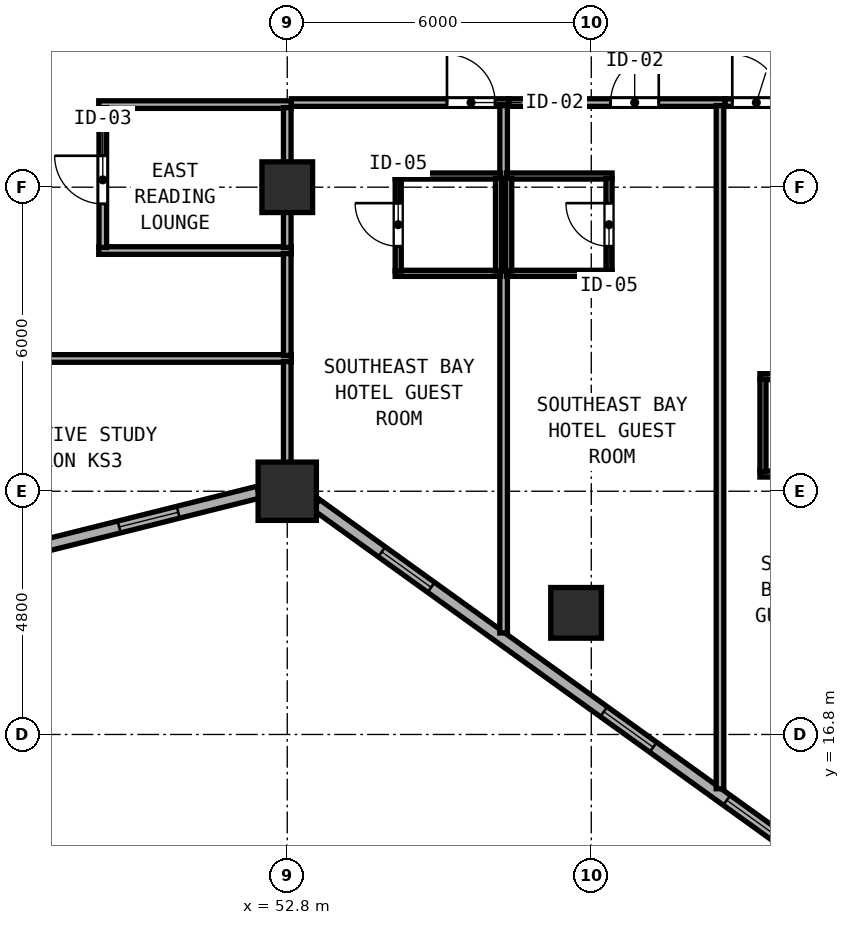
"""IFC4 building model, lengths in metres.
Left out: names, types, materials, properties, quantities, classifications, styles, units other than length and angle.
Written with IfcOpenShell. Run it as: python <this file> out.ifc"""

import sys

from ifc_helpers import new_model, si_unit, direction, frame, frame_2d, origin, origin_2d, place, context, subcontext, project, spatial, rectangle, hollow_rectangle, extrude, element, fill, save


model = new_model("IFC4")
c1 = context("Model", 3, precision=1e-05, world=origin(), true_north=direction((0.0, 1.0)))
c2 = subcontext(c1, "Body", "Model", "MODEL_VIEW")
j1 = project(units=[si_unit("LENGTHUNIT", "METRE"), si_unit("PLANEANGLEUNIT", "RADIAN")], contexts=[c1])
p1 = place(None, origin())
s1 = spatial("IfcSite", under=j1, at=p1, CompositionType="ELEMENT")
p2 = place(p1, origin())
s2 = spatial("IfcBuilding", under=s1, at=p2, CompositionType="ELEMENT")
p3 = place(p2, frame((0.0, 0.0, 55.2)))
s3 = spatial("IfcBuildingStorey", under=s2, at=p3, CompositionType="ELEMENT", Elevation=55.2)
p4 = place(p3, frame((52.8, 21.6, 0.0), z_axis=(0.0, 0.0, 1.0), x_axis=(1.0, 0.0, 0.0)))
e1 = element("IfcColumn", 1, at=p4, inside=s3, PredefinedType="COLUMN", context=c2, shape_type="SweptSolid", body=[
    extrude(hollow_rectangle(XDim=1.15, YDim=1.15, WallThickness=0.042, at=origin_2d()), origin(), (0.0, 0.0, 1.0), 3.8),
])
for number, where, z_axis, x_axis in (
    (2, (52.8, 27.6, 0.0), (0.0, 0.0, 1.0), (1.0, 0.0, 0.0)),
    (3, (58.5, 19.2, 0.0), (0.0, 0.0, 1.0), (1.0, 0.0, 0.0)),
):
    element("IfcColumn", number, at=place(p3, frame(where, z_axis=z_axis, x_axis=x_axis)), inside=s3, PredefinedType="COLUMN", context=c2, shape_type="SweptSolid", body=[
        extrude(hollow_rectangle(XDim=1.0, YDim=1.0, WallThickness=0.038, at=origin_2d()), origin(), (0.0, 0.0, 1.0), 3.8),
    ])
p5 = place(p3, frame((47.932, 20.507, 0.0), z_axis=(0.0, 0.0, 1.0), x_axis=(0.970145739396, 0.242522667667, 0.0)))
e4 = element("IfcWall", 4, at=p5, inside=s3, PredefinedType="SOLIDWALL", context=c2, shape_type="SweptSolid", body=[
    extrude(rectangle(XDim=4.433, YDim=0.24, at=frame_2d((2.217, 0.0))), origin(), (0.0, 0.0, 1.0), 3.097),
])
p6 = place(p5, frame((1.6, 0.0, 0.85)))
e5 = element("IfcOpeningElement", 5, at=p6, cuts=e4, PredefinedType="OPENING", context=c2, shape_type="SweptSolid", body=[
    extrude(rectangle(XDim=1.2, YDim=1.85, at=frame_2d((0.6, 0.925))), frame((0.0, 0.13, 0.0), z_axis=(0.0, -1.0, 0.0), x_axis=(1.0, 0.0, 0.0)), (0.0, 0.0, 1.0), 0.26),
])
p7 = place(p3, frame((53.367, 21.34, 0.0), z_axis=(0.0, 0.0, 1.0), x_axis=(0.811543176492, -0.58429245476, 0.0)))
e6 = element("IfcWall", 6, at=p7, inside=s3, PredefinedType="SOLIDWALL", context=c2, shape_type="SweptSolid", body=[
    extrude(rectangle(XDim=11.531, YDim=0.24, at=frame_2d((5.765, 0.0))), origin(), (0.0, 0.0, 1.0), 3.097),
])
p8 = place(p7, frame((1.6, 0.0, 0.85)))
e7 = element("IfcOpeningElement", 7, at=p8, cuts=e6, PredefinedType="OPENING", context=c2, shape_type="SweptSolid", body=[
    extrude(rectangle(XDim=1.2, YDim=1.85, at=frame_2d((0.6, 0.925))), frame((0.0, 0.13, 0.0), z_axis=(0.0, -1.0, 0.0), x_axis=(1.0, 0.0, 0.0)), (0.0, 0.0, 1.0), 0.26),
])
p9 = place(p7, frame((7.0, 0.0, 0.85)))
e8 = element("IfcOpeningElement", 8, at=p9, cuts=e6, PredefinedType="OPENING", context=c2, shape_type="SweptSolid", body=[
    extrude(rectangle(XDim=1.2, YDim=1.85, at=frame_2d((0.6, 0.925))), frame((0.0, 0.13, 0.0), z_axis=(0.0, -1.0, 0.0), x_axis=(1.0, 0.0, 0.0)), (0.0, 0.0, 1.0), 0.26),
])
p10 = place(p7, frame((9.99, 0.0, 0.85)))
e9 = element("IfcOpeningElement", 9, at=p10, cuts=e6, PredefinedType="OPENING", context=c2, shape_type="SweptSolid", body=[
    extrude(rectangle(XDim=1.2, YDim=1.85, at=frame_2d((0.6, 0.925))), frame((0.0, 0.13, 0.0), z_axis=(0.0, -1.0, 0.0), x_axis=(1.0, 0.0, 0.0)), (0.0, 0.0, 1.0), 0.26),
])
for number, where, z_axis, x_axis in (
    (10, (49.08, 29.23, 0.0), (0.0, 0.0, 1.0), (1.0, 0.0, 0.0)),
    (11, (49.08, 26.35, 0.0), (0.0, 0.0, 1.0), (1.0, 0.0, 0.0)),
):
    element("IfcWall", number, at=place(p3, frame(where, z_axis=z_axis, x_axis=x_axis)), inside=s3, PredefinedType="PARTITIONING", context=c2, shape_type="SweptSolid", body=[
        extrude(rectangle(XDim=3.8, YDim=0.15, at=frame_2d((1.9, 0.0))), origin(), (0.0, 0.0, 1.0), 3.6),
    ])
p11 = place(p3, frame((49.16, 26.41, 0.0), z_axis=(0.0, 0.0, 1.0), x_axis=(0.0, 1.0, 0.0)))
e12 = element("IfcWall", 12, at=p11, inside=s3, PredefinedType="PARTITIONING", context=c2, shape_type="SweptSolid", body=[
    extrude(rectangle(XDim=2.76, YDim=0.15, at=frame_2d((1.38, 0.0))), origin(), (0.0, 0.0, 1.0), 3.6),
])
p12 = place(p11, frame((0.86, 0.0, 0.0)))
e13 = element("IfcOpeningElement", 13, at=p12, cuts=e12, PredefinedType="OPENING", context=c2, shape_type="SweptSolid", body=[
    extrude(rectangle(XDim=0.95, YDim=2.12, at=frame_2d((0.475, 1.06))), frame((0.0, 0.085, 0.0), z_axis=(0.0, -1.0, 0.0), x_axis=(1.0, 0.0, 0.0)), (0.0, 0.0, 1.0), 0.17),
])
p13 = place(p3, frame((52.8, 26.41, 0.0), z_axis=(0.0, 0.0, 1.0), x_axis=(0.0, 1.0, 0.0)))
e14 = element("IfcWall", 14, at=p13, inside=s3, PredefinedType="PARTITIONING", context=c2, shape_type="SweptSolid", body=[
    extrude(rectangle(XDim=2.76, YDim=0.15, at=frame_2d((1.38, 0.0))), origin(), (0.0, 0.0, 1.0), 3.097),
])
p14 = place(p3, frame((45.682, 24.22, 0.0), z_axis=(0.0, 0.0, 1.0), x_axis=(1.0, 0.0, 0.0)))
e15 = element("IfcWall", 15, at=p14, inside=s3, PredefinedType="PARTITIONING", context=c2, shape_type="SweptSolid", body=[
    extrude(rectangle(XDim=7.198, YDim=0.15, at=frame_2d((3.599, 0.0))), origin(), (0.0, 0.0, 1.0), 3.6),
])
p15 = place(p14, frame((2.143, 0.0, 0.0), z_axis=(0.0, 0.0, 1.0), x_axis=(-1.0, 0.0, 0.0)))
e16 = element("IfcOpeningElement", 16, at=p15, cuts=e15, PredefinedType="OPENING", context=c2, shape_type="SweptSolid", body=[
    extrude(rectangle(XDim=0.95, YDim=2.12, at=frame_2d((0.475, 1.06))), frame((0.0, 0.085, 0.0), z_axis=(0.0, -1.0, 0.0), x_axis=(1.0, 0.0, 0.0)), (0.0, 0.0, 1.0), 0.17),
])
p16 = place(p3, frame((52.8, 21.819, 0.0), z_axis=(0.0, 0.0, 1.0), x_axis=(0.0, 1.0, 0.0)))
e17 = element("IfcWall", 17, at=p16, inside=s3, PredefinedType="PARTITIONING", context=c2, shape_type="SweptSolid", body=[
    extrude(rectangle(XDim=2.341, YDim=0.15, at=frame_2d((1.171, 0.0))), origin(), (0.0, 0.0, 1.0), 3.097),
])
p17 = place(p3, frame((52.882, 29.27, 0.0), z_axis=(0.0, 0.0, 1.0), x_axis=(1.0, 0.0, 0.0)))
e18 = element("IfcWall", 18, at=p17, inside=s3, PredefinedType="PARTITIONING", context=c2, shape_type="SweptSolid", body=[
    extrude(rectangle(XDim=4.288, YDim=0.15, at=frame_2d((2.144, 0.0))), origin(), (0.0, 0.0, 1.0), 3.6),
])
p18 = place(p17, frame((4.02, 0.0, 0.0), z_axis=(0.0, 0.0, 1.0), x_axis=(-1.0, 0.0, 0.0)))
e19 = element("IfcOpeningElement", 19, at=p18, cuts=e18, PredefinedType="OPENING", context=c2, shape_type="SweptSolid", body=[
    extrude(rectangle(XDim=0.95, YDim=2.15, at=frame_2d((0.475, 1.075))), frame((0.0, 0.085, 0.0), z_axis=(0.0, -1.0, 0.0), x_axis=(1.0, 0.0, 0.0)), (0.0, 0.0, 1.0), 0.17),
])
p19 = place(p3, frame((52.8, 24.28, 0.0), z_axis=(0.0, 0.0, 1.0), x_axis=(0.0, 1.0, 0.0)))
e20 = element("IfcWall", 20, at=p19, inside=s3, PredefinedType="PARTITIONING", context=c2, shape_type="SweptSolid", body=[
    extrude(rectangle(XDim=2.01, YDim=0.15, at=frame_2d((1.005, 0.0))), origin(), (0.0, 0.0, 1.0), 3.097),
])
p20 = place(p3, frame((57.07, 18.803, 0.0), z_axis=(0.0, 0.0, 1.0), x_axis=(0.0, 1.0, 0.0)))
e21 = element("IfcWall", 21, at=p20, inside=s3, PredefinedType="PARTITIONING", context=c2, shape_type="SweptSolid", body=[
    extrude(rectangle(XDim=10.407, YDim=0.15, at=frame_2d((5.204, 0.0))), origin(), (0.0, 0.0, 1.0), 3.6),
])
p21 = place(p3, frame((54.93, 27.82, 0.0), z_axis=(0.0, 0.0, 1.0), x_axis=(1.0, 0.0, 0.0)))
e22 = element("IfcWall", 22, at=p21, inside=s3, PredefinedType="PARTITIONING", context=c2, shape_type="SweptSolid", body=[
    extrude(rectangle(XDim=2.08, YDim=0.12, at=frame_2d((1.04, 0.0))), origin(), (0.0, 0.0, 1.0), 3.097),
])
p22 = place(p3, frame((54.93, 25.9, 0.0), z_axis=(0.0, 0.0, 1.0), x_axis=(1.0, 0.0, 0.0)))
e23 = element("IfcWall", 23, at=p22, inside=s3, PredefinedType="PARTITIONING", context=c2, shape_type="SweptSolid", body=[
    extrude(rectangle(XDim=2.08, YDim=0.12, at=frame_2d((1.04, 0.0))), origin(), (0.0, 0.0, 1.0), 3.6),
])
p23 = place(p3, frame((54.99, 25.945, 0.0), z_axis=(0.0, 0.0, 1.0), x_axis=(0.0, 1.0, 0.0)))
e24 = element("IfcWall", 24, at=p23, inside=s3, PredefinedType="PARTITIONING", context=c2, shape_type="SweptSolid", body=[
    extrude(rectangle(XDim=1.83, YDim=0.12, at=frame_2d((0.915, 0.0))), origin(), (0.0, 0.0, 1.0), 3.6),
])
p24 = place(p23, frame((1.34, 0.0, 0.0), z_axis=(0.0, 0.0, 1.0), x_axis=(-1.0, 0.0, 0.0)))
e25 = element("IfcOpeningElement", 25, at=p24, cuts=e24, PredefinedType="OPENING", context=c2, shape_type="SweptSolid", body=[
    extrude(rectangle(XDim=0.85, YDim=2.1, at=frame_2d((0.425, 1.05))), frame((0.0, 0.07, 0.0), z_axis=(0.0, -1.0, 0.0), x_axis=(1.0, 0.0, 0.0)), (0.0, 0.0, 1.0), 0.14),
])
p25 = place(p3, frame((56.97, 25.945, 0.0), z_axis=(0.0, 0.0, 1.0), x_axis=(0.0, 1.0, 0.0)))
e26 = element("IfcWall", 26, at=p25, inside=s3, PredefinedType="PARTITIONING", context=c2, shape_type="SweptSolid", body=[
    extrude(rectangle(XDim=1.83, YDim=0.12, at=frame_2d((0.915, 0.0))), origin(), (0.0, 0.0, 1.0), 3.6),
])
p26 = place(p3, frame((57.172, 29.27, 0.0), z_axis=(0.0, 0.0, 1.0), x_axis=(1.0, 0.0, 0.0)))
e27 = element("IfcWall", 27, at=p26, inside=s3, PredefinedType="PARTITIONING", context=c2, shape_type="SweptSolid", body=[
    extrude(rectangle(XDim=4.268, YDim=0.15, at=frame_2d((2.134, 0.0))), origin(), (0.0, 0.0, 1.0), 3.6),
])
p27 = place(p26, frame((2.959, 0.0, 0.0), z_axis=(0.0, 0.0, 1.0), x_axis=(-1.0, 0.0, 0.0)))
e28 = element("IfcOpeningElement", 28, at=p27, cuts=e27, PredefinedType="OPENING", context=c2, shape_type="SweptSolid", body=[
    extrude(rectangle(XDim=0.95, YDim=2.15, at=frame_2d((0.475, 1.075))), frame((0.0, 0.085, 0.0), z_axis=(0.0, -1.0, 0.0), x_axis=(1.0, 0.0, 0.0)), (0.0, 0.0, 1.0), 0.17),
])
p28 = place(p3, frame((61.34, 15.729, 0.0), z_axis=(0.0, 0.0, 1.0), x_axis=(0.0, 1.0, 0.0)))
e29 = element("IfcWall", 29, at=p28, inside=s3, PredefinedType="PARTITIONING", context=c2, shape_type="SweptSolid", body=[
    extrude(rectangle(XDim=13.481, YDim=0.15, at=frame_2d((6.741, 0.0))), origin(), (0.0, 0.0, 1.0), 3.6),
])
p29 = place(p3, frame((57.13, 27.82, 0.0), z_axis=(0.0, 0.0, 1.0), x_axis=(1.0, 0.0, 0.0)))
e30 = element("IfcWall", 30, at=p29, inside=s3, PredefinedType="PARTITIONING", context=c2, shape_type="SweptSolid", body=[
    extrude(rectangle(XDim=2.08, YDim=0.12, at=frame_2d((1.04, 0.0))), origin(), (0.0, 0.0, 1.0), 3.097),
])
p30 = place(p3, frame((57.13, 25.9, 0.0), z_axis=(0.0, 0.0, 1.0), x_axis=(1.0, 0.0, 0.0)))
e31 = element("IfcWall", 31, at=p30, inside=s3, PredefinedType="PARTITIONING", context=c2, shape_type="SweptSolid", body=[
    extrude(rectangle(XDim=2.08, YDim=0.12, at=frame_2d((1.04, 0.0))), origin(), (0.0, 0.0, 1.0), 3.6),
])
p31 = place(p3, frame((57.17, 25.945, 0.0), z_axis=(0.0, 0.0, 1.0), x_axis=(0.0, 1.0, 0.0)))
e32 = element("IfcWall", 32, at=p31, inside=s3, PredefinedType="PARTITIONING", context=c2, shape_type="SweptSolid", body=[
    extrude(rectangle(XDim=1.83, YDim=0.12, at=frame_2d((0.915, 0.0))), origin(), (0.0, 0.0, 1.0), 3.6),
])
p32 = place(p3, frame((59.15, 25.945, 0.0), z_axis=(0.0, 0.0, 1.0), x_axis=(0.0, 1.0, 0.0)))
e33 = element("IfcWall", 33, at=p32, inside=s3, PredefinedType="PARTITIONING", context=c2, shape_type="SweptSolid", body=[
    extrude(rectangle(XDim=1.83, YDim=0.12, at=frame_2d((0.915, 0.0))), origin(), (0.0, 0.0, 1.0), 3.6),
])
p33 = place(p32, frame((0.49, 0.0, 0.0)))
e34 = element("IfcOpeningElement", 34, at=p33, cuts=e33, PredefinedType="OPENING", context=c2, shape_type="SweptSolid", body=[
    extrude(rectangle(XDim=0.85, YDim=2.1, at=frame_2d((0.425, 1.05))), frame((0.0, 0.07, 0.0), z_axis=(0.0, -1.0, 0.0), x_axis=(1.0, 0.0, 0.0)), (0.0, 0.0, 1.0), 0.14),
])
p34 = place(p3, frame((61.442, 29.27, 0.0), z_axis=(0.0, 0.0, 1.0), x_axis=(1.0, 0.0, 0.0)))
e35 = element("IfcWall", 35, at=p34, inside=s3, PredefinedType="PARTITIONING", context=c2, shape_type="SweptSolid", body=[
    extrude(rectangle(XDim=3.658, YDim=0.15, at=frame_2d((1.829, 0.0))), origin(), (0.0, 0.0, 1.0), 3.6),
])
p35 = place(p34, frame((1.09, 0.0, 0.0), z_axis=(0.0, 0.0, 1.0), x_axis=(-1.0, 0.0, 0.0)))
e36 = element("IfcOpeningElement", 36, at=p35, cuts=e35, PredefinedType="OPENING", context=c2, shape_type="SweptSolid", body=[
    extrude(rectangle(XDim=0.95, YDim=2.15, at=frame_2d((0.475, 1.075))), frame((0.0, 0.085, 0.0), z_axis=(0.0, -1.0, 0.0), x_axis=(1.0, 0.0, 0.0)), (0.0, 0.0, 1.0), 0.17),
])
p36 = place(p3, frame((62.128, 23.86, 0.0), z_axis=(0.0, 0.0, 1.0), x_axis=(1.0, 0.0, 0.0)))
e37 = element("IfcWall", 37, at=p36, inside=s3, PredefinedType="PARTITIONING", context=c2, shape_type="SweptSolid", body=[
    extrude(rectangle(XDim=2.1, YDim=0.12, at=frame_2d((1.05, 0.0))), origin(), (0.0, 0.0, 1.0), 3.6),
])
p37 = place(p36, frame((1.475, 0.0, 0.0), z_axis=(0.0, 0.0, 1.0), x_axis=(-1.0, 0.0, 0.0)))
e38 = element("IfcOpeningElement", 38, at=p37, cuts=e37, PredefinedType="OPENING", context=c2, shape_type="SweptSolid", body=[
    extrude(rectangle(XDim=0.85, YDim=2.1, at=frame_2d((0.425, 1.05))), frame((0.0, 0.07, 0.0), z_axis=(0.0, -1.0, 0.0), x_axis=(1.0, 0.0, 0.0)), (0.0, 0.0, 1.0), 0.14),
])
p38 = place(p3, frame((62.128, 21.94, 0.0), z_axis=(0.0, 0.0, 1.0), x_axis=(1.0, 0.0, 0.0)))
e39 = element("IfcWall", 39, at=p38, inside=s3, PredefinedType="PARTITIONING", context=c2, shape_type="SweptSolid", body=[
    extrude(rectangle(XDim=2.1, YDim=0.12, at=frame_2d((1.05, 0.0))), origin(), (0.0, 0.0, 1.0), 3.6),
])
p39 = place(p3, frame((62.188, 21.985, 0.0), z_axis=(0.0, 0.0, 1.0), x_axis=(0.0, 1.0, 0.0)))
e40 = element("IfcWall", 40, at=p39, inside=s3, PredefinedType="PARTITIONING", context=c2, shape_type="SweptSolid", body=[
    extrude(rectangle(XDim=1.83, YDim=0.12, at=frame_2d((0.915, 0.0))), origin(), (0.0, 0.0, 1.0), 3.6),
])
p40 = place(p6, origin())
e41 = element("IfcWindow", 41, at=p40, inside=s3, PartitioningType="SINGLE_PANEL", PredefinedType="WINDOW", context=c2, shape_type="SweptSolid", body=[
    extrude(rectangle(XDim=1.2, YDim=1.85, at=frame_2d((0.6, 0.925))), frame((0.0, 0.03, 0.0), z_axis=(0.0, -1.0, 0.0), x_axis=(1.0, 0.0, 0.0)), (0.0, 0.0, 1.0), 0.06),
])
fill(e5, e41)
p41 = place(p8, origin())
e42 = element("IfcWindow", 42, at=p41, inside=s3, PartitioningType="SINGLE_PANEL", PredefinedType="WINDOW", context=c2, shape_type="SweptSolid", body=[
    extrude(rectangle(XDim=1.2, YDim=1.85, at=frame_2d((0.6, 0.925))), frame((0.0, 0.03, 0.0), z_axis=(0.0, -1.0, 0.0), x_axis=(1.0, 0.0, 0.0)), (0.0, 0.0, 1.0), 0.06),
])
fill(e7, e42)
p42 = place(p9, origin())
e43 = element("IfcWindow", 43, at=p42, inside=s3, PartitioningType="SINGLE_PANEL", PredefinedType="WINDOW", context=c2, shape_type="SweptSolid", body=[
    extrude(rectangle(XDim=1.2, YDim=1.85, at=frame_2d((0.6, 0.925))), frame((0.0, 0.03, 0.0), z_axis=(0.0, -1.0, 0.0), x_axis=(1.0, 0.0, 0.0)), (0.0, 0.0, 1.0), 0.06),
])
fill(e8, e43)
p43 = place(p12, origin())
e44 = element("IfcDoor", 44, at=p43, inside=s3, OperationType="SINGLE_SWING_RIGHT", PredefinedType="DOOR", context=c2, shape_type="SweptSolid", body=[
    extrude(rectangle(XDim=0.95, YDim=2.12, at=frame_2d((0.475, 1.06))), frame((0.0, 0.025, 0.0), z_axis=(0.0, -1.0, 0.0), x_axis=(1.0, 0.0, 0.0)), (0.0, 0.0, 1.0), 0.05),
])
fill(e13, e44)
p44 = place(p18, origin())
e45 = element("IfcDoor", 45, at=p44, inside=s3, OperationType="SINGLE_SWING_RIGHT", PredefinedType="DOOR", context=c2, shape_type="SweptSolid", body=[
    extrude(rectangle(XDim=0.95, YDim=2.15, at=frame_2d((0.475, 1.075))), frame((0.0, 0.025, 0.0), z_axis=(0.0, -1.0, 0.0), x_axis=(1.0, 0.0, 0.0)), (0.0, 0.0, 1.0), 0.05),
])
fill(e19, e45)
p45 = place(p24, origin())
e46 = element("IfcDoor", 46, at=p45, inside=s3, OperationType="SINGLE_SWING_LEFT", PredefinedType="DOOR", context=c2, shape_type="SweptSolid", body=[
    extrude(rectangle(XDim=0.85, YDim=2.1, at=frame_2d((0.425, 1.05))), frame((0.0, 0.025, 0.0), z_axis=(0.0, -1.0, 0.0), x_axis=(1.0, 0.0, 0.0)), (0.0, 0.0, 1.0), 0.05),
])
fill(e25, e46)
p46 = place(p27, origin())
e47 = element("IfcDoor", 47, at=p46, inside=s3, OperationType="SINGLE_SWING_LEFT", PredefinedType="DOOR", context=c2, shape_type="SweptSolid", body=[
    extrude(rectangle(XDim=0.95, YDim=2.15, at=frame_2d((0.475, 1.075))), frame((0.0, 0.025, 0.0), z_axis=(0.0, -1.0, 0.0), x_axis=(1.0, 0.0, 0.0)), (0.0, 0.0, 1.0), 0.05),
])
fill(e28, e47)
p47 = place(p33, origin())
e48 = element("IfcDoor", 48, at=p47, inside=s3, OperationType="SINGLE_SWING_RIGHT", PredefinedType="DOOR", context=c2, shape_type="SweptSolid", body=[
    extrude(rectangle(XDim=0.85, YDim=2.1, at=frame_2d((0.425, 1.05))), frame((0.0, 0.025, 0.0), z_axis=(0.0, -1.0, 0.0), x_axis=(1.0, 0.0, 0.0)), (0.0, 0.0, 1.0), 0.05),
])
fill(e34, e48)
p48 = place(p35, origin())
e49 = element("IfcDoor", 49, at=p48, inside=s3, OperationType="SINGLE_SWING_RIGHT", PredefinedType="DOOR", context=c2, shape_type="SweptSolid", body=[
    extrude(rectangle(XDim=0.95, YDim=2.15, at=frame_2d((0.475, 1.075))), frame((0.0, 0.025, 0.0), z_axis=(0.0, -1.0, 0.0), x_axis=(1.0, 0.0, 0.0)), (0.0, 0.0, 1.0), 0.05),
])
fill(e36, e49)
p49 = place(p10, origin())
e50 = element("IfcWindow", 50, at=p49, inside=s3, PartitioningType="SINGLE_PANEL", PredefinedType="WINDOW", context=c2, shape_type="SweptSolid", body=[
    extrude(rectangle(XDim=1.2, YDim=1.85, at=frame_2d((0.6, 0.925))), frame((0.0, 0.03, 0.0), z_axis=(0.0, -1.0, 0.0), x_axis=(1.0, 0.0, 0.0)), (0.0, 0.0, 1.0), 0.06),
])
fill(e9, e50)
save(model, sys.argv[1])
